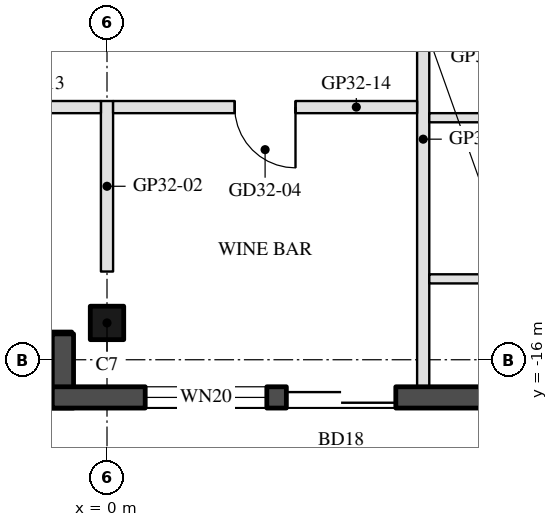
"""IFC4 building model, lengths in metres.
Left out: names, types, materials, properties, quantities, classifications, styles, units other than length and angle.
Written with IfcOpenShell. Run it as: python <this file> out.ifc"""

import sys

from ifc_helpers import new_model, si_unit, direction, frame, frame_2d, origin, origin_2d, place, context, subcontext, project, spatial, rectangle, hollow_rectangle, extrude, boolean, halfspace, element, fill, save


model = new_model("IFC4")
c1 = context("Model", 3, precision=1e-05, world=origin(), true_north=direction((0.0, 1.0)))
c2 = subcontext(c1, "Body", "Model", "MODEL_VIEW")
j1 = project(units=[si_unit("LENGTHUNIT", "METRE"), si_unit("PLANEANGLEUNIT", "RADIAN")], contexts=[c1])
p1 = place(None, origin())
s1 = spatial("IfcSite", under=j1, at=p1, CompositionType="ELEMENT")
p2 = place(p1, origin())
s2 = spatial("IfcBuilding", under=s1, at=p2, CompositionType="ELEMENT")
p3 = place(p2, frame((0.0, 0.0, 309.6)))
s3 = spatial("IfcBuildingStorey", under=s2, at=p3, CompositionType="ELEMENT", Elevation=309.6)
p4 = place(p3, frame((0.0, -15.395, 0.0), z_axis=(0.0, 0.151513133163, 0.98845524455), x_axis=(-1.0, 0.0, 0.0)))
e1 = element("IfcColumn", 1, at=p4, inside=s3, PredefinedType="COLUMN", context=c2, shape_type="SweptSolid", body=[
    boolean("DIFFERENCE", boolean("DIFFERENCE", extrude(hollow_rectangle(XDim=0.55, YDim=0.55, WallThickness=0.025, at=origin_2d()), origin(), (0.0, 0.0, 1.0), 3.743), halfspace(frame((0.0, 0.0, 0.031), z_axis=(0.0, 0.0, 1.0), x_axis=(1.0, 0.0, 0.0)), True)), halfspace(frame((0.0, 0.0, 3.712), z_axis=(0.0, 0.0, 1.0), x_axis=(1.0, 0.0, 0.0)), False)),
])
p5 = place(p3, frame((-6.179, -15.719, 0.0), z_axis=(0.0, 0.0, 1.0), x_axis=(1.0, 0.0, 0.0)))
e2 = element("IfcWall", 2, at=p5, inside=s3, PredefinedType="SOLIDWALL", context=c2, shape_type="SweptSolid", body=[
    extrude(rectangle(XDim=5.599, YDim=0.35, at=frame_2d((2.799, 0.0))), origin(), (0.0, 0.0, 1.0), 3.55),
])
p6 = place(p5, frame((0.77, 0.0, 0.0)))
e3 = element("IfcOpeningElement", 3, at=p6, cuts=e2, PredefinedType="OPENING", context=c2, shape_type="SweptSolid", body=[
    extrude(rectangle(XDim=2.4, YDim=2.4, at=frame_2d((1.2, 1.2))), frame((0.0, 0.185, 0.0), z_axis=(0.0, -1.0, 0.0), x_axis=(1.0, 0.0, 0.0)), (0.0, 0.0, 1.0), 0.37),
])
p7 = place(p5, frame((3.47, 0.0, 0.3)))
e4 = element("IfcOpeningElement", 4, at=p7, cuts=e2, PredefinedType="OPENING", context=c2, shape_type="SweptSolid", body=[
    extrude(rectangle(XDim=1.3, YDim=2.65, at=frame_2d((0.65, 1.325))), frame((0.0, 0.185, 0.0), z_axis=(0.0, -1.0, 0.0), x_axis=(1.0, 0.0, 0.0)), (0.0, 0.0, 1.0), 0.37),
])
p8 = place(p3, frame((-0.725, -15.575, 0.0), z_axis=(0.0, 0.0, 1.0), x_axis=(0.0, -1.0, 0.0)))
e5 = element("IfcWall", 5, at=p8, inside=s3, PredefinedType="SOLIDWALL", context=c2, shape_type="SweptSolid", body=[
    extrude(rectangle(XDim=1.22, YDim=0.35, at=frame_2d((0.61, 0.0))), origin(), (0.0, 0.0, 1.0), 3.55),
])
p9 = place(p3, frame((-0.9, -16.62, 0.0), z_axis=(0.0, 0.0, 1.0), x_axis=(1.0, 0.0, 0.0)))
e6 = element("IfcWall", 6, at=p9, inside=s3, PredefinedType="SOLIDWALL", context=c2, shape_type="SweptSolid", body=[
    extrude(rectangle(XDim=8.559, YDim=0.35, at=frame_2d((4.279, 0.0))), origin(), (0.0, 0.0, 1.0), 3.55),
])
p10 = place(p9, frame((3.85, 0.0, 0.0)))
e7 = element("IfcOpeningElement", 7, at=p10, cuts=e6, PredefinedType="OPENING", context=c2, shape_type="SweptSolid", body=[
    extrude(rectangle(XDim=1.8, YDim=2.4, at=frame_2d((0.9, 1.2))), frame((0.0, 0.185, 0.0), z_axis=(0.0, -1.0, 0.0), x_axis=(1.0, 0.0, 0.0)), (0.0, 0.0, 1.0), 0.37),
])
p11 = place(p9, frame((1.528, 0.0, 0.3)))
e8 = element("IfcOpeningElement", 8, at=p11, cuts=e6, PredefinedType="OPENING", context=c2, shape_type="SweptSolid", body=[
    extrude(rectangle(XDim=2.0, YDim=2.65, at=frame_2d((1.0, 1.325))), frame((0.0, 0.185, 0.0), z_axis=(0.0, -1.0, 0.0), x_axis=(1.0, 0.0, 0.0)), (0.0, 0.0, 1.0), 0.37),
])
p12 = place(p3, frame((0.0, -14.549, 0.0), z_axis=(0.0, 0.0, 1.0), x_axis=(0.0, 1.0, 0.0)))
e9 = element("IfcWall", 9, at=p12, inside=s3, PredefinedType="PARTITIONING", context=c2, shape_type="SweptSolid", body=[
    extrude(rectangle(XDim=2.805, YDim=0.2, at=frame_2d((1.402, 0.0))), origin(), (0.0, 0.0, 1.0), 3.1),
])
p13 = place(p3, frame((5.2, -16.445, 0.0), z_axis=(0.0, 0.0, 1.0), x_axis=(0.0, 1.0, 0.0)))
e10 = element("IfcWall", 10, at=p13, inside=s3, PredefinedType="PARTITIONING", context=c2, shape_type="SweptSolid", body=[
    extrude(rectangle(XDim=8.145, YDim=0.2, at=frame_2d((4.072, 0.0))), origin(), (0.0, 0.0, 1.0), 3.1),
])
p14 = place(p3, frame((-0.1, -11.844, 0.0), z_axis=(0.0, 0.0, 1.0), x_axis=(-1.0, 0.0, 0.0)))
e11 = element("IfcWall", 11, at=p14, inside=s3, PredefinedType="PARTITIONING", context=c2, shape_type="SweptSolid", body=[
    extrude(rectangle(XDim=5.829, YDim=0.2, at=frame_2d((2.914, 0.0))), origin(), (0.0, 0.0, 1.0), 3.1),
])
p15 = place(p14, frame((2.414, 0.0, 0.0)))
e12 = element("IfcOpeningElement", 12, at=p15, cuts=e11, PredefinedType="OPENING", context=c2, shape_type="SweptSolid", body=[
    extrude(rectangle(XDim=1.0, YDim=2.1, at=frame_2d((0.5, 1.05))), frame((0.0, 0.11, 0.0), z_axis=(0.0, -1.0, 0.0), x_axis=(1.0, 0.0, 0.0)), (0.0, 0.0, 1.0), 0.22),
])
p16 = place(p3, frame((5.1, -11.844, 0.0), z_axis=(0.0, 0.0, 1.0), x_axis=(-1.0, 0.0, 0.0)))
e13 = element("IfcWall", 13, at=p16, inside=s3, PredefinedType="PARTITIONING", context=c2, shape_type="SweptSolid", body=[
    extrude(rectangle(XDim=5.0, YDim=0.2, at=frame_2d((2.5, 0.0))), origin(), (0.0, 0.0, 1.0), 3.1),
])
p17 = place(p16, frame((2.0, 0.0, 0.0)))
e14 = element("IfcOpeningElement", 14, at=p17, cuts=e13, PredefinedType="OPENING", context=c2, shape_type="SweptSolid", body=[
    extrude(rectangle(XDim=1.0, YDim=2.1, at=frame_2d((0.5, 1.05))), frame((0.0, 0.11, 0.0), z_axis=(0.0, -1.0, 0.0), x_axis=(1.0, 0.0, 0.0)), (0.0, 0.0, 1.0), 0.22),
])
for number, where, z_axis, x_axis in (
    (15, (5.3, -14.67, 0.0), (0.0, 0.0, 1.0), (1.0, 0.0, 0.0)),
    (16, (5.3, -12.02, 0.0), (0.0, 0.0, 1.0), (1.0, 0.0, 0.0)),
):
    element("IfcWall", number, at=place(p3, frame(where, z_axis=z_axis, x_axis=x_axis)), inside=s3, PredefinedType="PARTITIONING", context=c2, shape_type="SweptSolid", body=[
        extrude(rectangle(XDim=1.85, YDim=0.15, at=frame_2d((0.925, 0.0))), origin(), (0.0, 0.0, 1.0), 3.1),
    ])
p18 = place(p10, frame((1.8, 0.0, 0.0), z_axis=(0.0, 0.0, 1.0), x_axis=(-1.0, 0.0, 0.0)))
e17 = element("IfcDoor", 17, at=p18, inside=s3, OperationType="SLIDING_TO_LEFT", PredefinedType="DOOR", context=c2, shape_type="SweptSolid", body=[
    extrude(rectangle(XDim=1.8, YDim=2.4, at=frame_2d((0.9, 1.2))), frame((0.0, 0.025, 0.0), z_axis=(0.0, -1.0, 0.0), x_axis=(1.0, 0.0, 0.0)), (0.0, 0.0, 1.0), 0.05),
])
fill(e7, e17)
p19 = place(p11, origin())
e18 = element("IfcWindow", 18, at=p19, inside=s3, PartitioningType="SINGLE_PANEL", PredefinedType="WINDOW", context=c2, shape_type="SweptSolid", body=[
    extrude(rectangle(XDim=2.0, YDim=2.65, at=frame_2d((1.0, 1.325))), frame((0.0, 0.03, 0.0), z_axis=(0.0, -1.0, 0.0), x_axis=(1.0, 0.0, 0.0)), (0.0, 0.0, 1.0), 0.06),
])
fill(e8, e18)
p20 = place(p17, origin())
e19 = element("IfcDoor", 19, at=p20, inside=s3, OperationType="SINGLE_SWING_LEFT", PredefinedType="DOOR", context=c2, shape_type="SweptSolid", body=[
    extrude(rectangle(XDim=1.0, YDim=2.1, at=frame_2d((0.5, 1.05))), frame((0.0, 0.025, 0.0), z_axis=(0.0, -1.0, 0.0), x_axis=(1.0, 0.0, 0.0)), (0.0, 0.0, 1.0), 0.05),
])
fill(e14, e19)
save(model, sys.argv[1])
